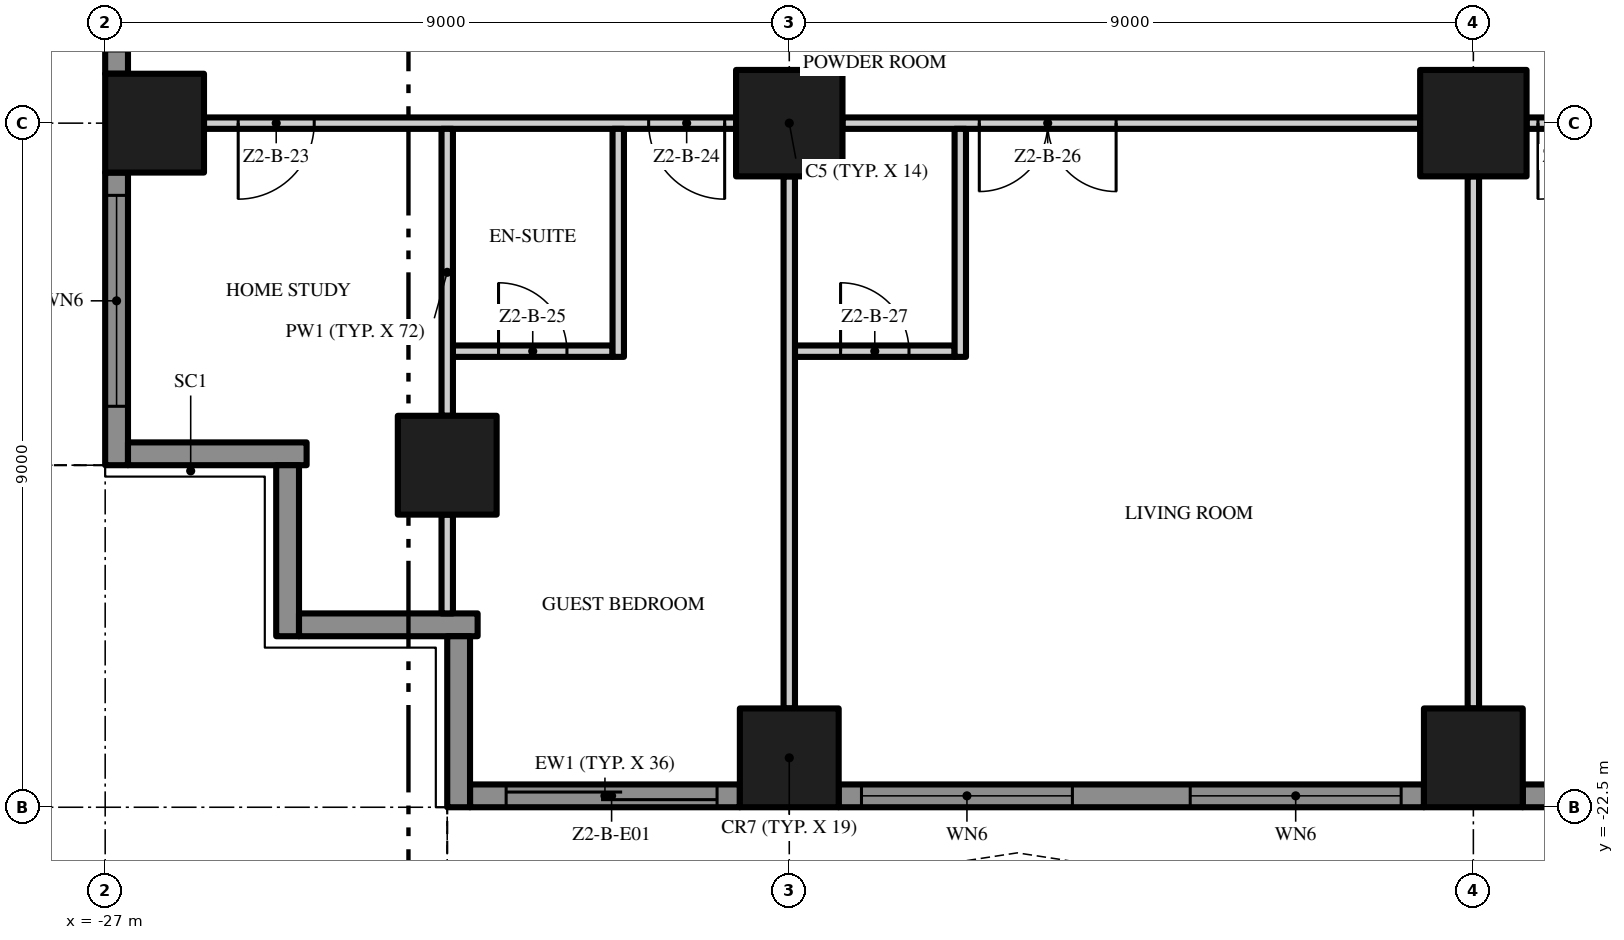
"""IFC4 building model, lengths in metres.
Left out: names, types, materials, properties, quantities, classifications, styles, units other than length and angle.
Written with IfcOpenShell. Run it as: python <this file> out.ifc"""

import sys

from ifc_helpers import new_model, si_unit, direction, frame, frame_2d, origin, origin_2d, place, context, subcontext, project, spatial, polyline, rectangle, outline, extrude, element, fill, save


model = new_model("IFC4")
c1 = context("Model", 3, precision=1e-05, world=origin(), true_north=direction((0.0, 1.0)))
c2 = subcontext(c1, "Body", "Model", "MODEL_VIEW")
j1 = project(units=[si_unit("LENGTHUNIT", "METRE"), si_unit("PLANEANGLEUNIT", "RADIAN")], contexts=[c1])
p1 = place(None, origin())
s1 = spatial("IfcSite", under=j1, at=p1, CompositionType="ELEMENT")
p2 = place(p1, origin())
s2 = spatial("IfcBuilding", under=s1, at=p2, CompositionType="ELEMENT")
p3 = place(p2, frame((0.0, 0.0, 84.6)))
s3 = spatial("IfcBuildingStorey", under=s2, at=p3, CompositionType="ELEMENT", Elevation=84.6)
p4 = place(p3, frame((-18.0, -13.5, 0.0), z_axis=(0.0, 0.0, 1.0), x_axis=(1.0, 0.0, 0.0)))
e1 = element("IfcColumn", 1, at=p4, inside=s3, PredefinedType="COLUMN", context=c2, shape_type="SweptSolid", body=[
    extrude(rectangle(XDim=1.4, YDim=1.4, at=origin_2d()), origin(), (0.0, 0.0, 1.0), 3.5),
])
for number, where, z_axis, x_axis in (
    (2, (-18.0, -21.85, 0.0), (0.0, 0.0, 1.0), (1.0, 0.0, 0.0)),
    (3, (-26.35, -13.5, 0.0), (0.0, 0.0, 1.0), (1.0, 0.0, 0.0)),
    (4, (-22.5, -18.0, 0.0), (0.0, 0.0, 1.0), (1.0, 0.0, 0.0)),
):
    element("IfcColumn", number, at=place(p3, frame(where, z_axis=z_axis, x_axis=x_axis)), inside=s3, PredefinedType="COLUMN", context=c2, shape_type="SweptSolid", body=[
        extrude(rectangle(XDim=1.3, YDim=1.3, at=origin_2d()), origin(), (0.0, 0.0, 1.0), 3.5),
    ])
p5 = place(p3, frame((-9.0, -13.5, 0.0), z_axis=(0.0, 0.0, 1.0), x_axis=(1.0, 0.0, 0.0)))
e5 = element("IfcColumn", 5, at=p5, inside=s3, PredefinedType="COLUMN", context=c2, shape_type="SweptSolid", body=[
    extrude(rectangle(XDim=1.4, YDim=1.4, at=origin_2d()), origin(), (0.0, 0.0, 1.0), 3.5),
])
p6 = place(p3, frame((-9.0, -21.85, 0.0), z_axis=(0.0, 0.0, 1.0), x_axis=(1.0, 0.0, 0.0)))
e6 = element("IfcColumn", 6, at=p6, inside=s3, PredefinedType="COLUMN", context=c2, shape_type="SweptSolid", body=[
    extrude(rectangle(XDim=1.3, YDim=1.3, at=origin_2d()), origin(), (0.0, 0.0, 1.0), 3.5),
])
p7 = place(p3, frame((-18.65, -22.35, 0.0), z_axis=(0.0, 0.0, 1.0), x_axis=(-1.0, 0.0, 0.0)))
e7 = element("IfcWall", 7, at=p7, inside=s3, PredefinedType="SOLIDWALL", context=c2, shape_type="SweptSolid", body=[
    extrude(rectangle(XDim=3.55, YDim=0.3, at=frame_2d((1.775, 0.0))), origin(), (0.0, 0.0, 1.0), 3.5),
])
p8 = place(p7, frame((0.3, 0.0, 0.0)))
e8 = element("IfcOpeningElement", 8, at=p8, cuts=e7, PredefinedType="OPENING", context=c2, shape_type="SweptSolid", body=[
    extrude(rectangle(XDim=2.775, YDim=2.4, at=frame_2d((1.387, 1.2))), frame((0.0, 0.16, 0.0), z_axis=(0.0, -1.0, 0.0), x_axis=(1.0, 0.0, 0.0)), (0.0, 0.0, 1.0), 0.32),
])
p9 = place(p3, frame((-9.65, -22.35, 0.0), z_axis=(0.0, 0.0, 1.0), x_axis=(-1.0, 0.0, 0.0)))
e9 = element("IfcWall", 9, at=p9, inside=s3, PredefinedType="SOLIDWALL", context=c2, shape_type="SweptSolid", body=[
    extrude(rectangle(XDim=7.7, YDim=0.3, at=frame_2d((3.85, 0.0))), origin(), (0.0, 0.0, 1.0), 3.5),
])
p10 = place(p9, frame((4.625, 0.0, 0.45)))
e10 = element("IfcOpeningElement", 10, at=p10, cuts=e9, PredefinedType="OPENING", context=c2, shape_type="SweptSolid", body=[
    extrude(rectangle(XDim=2.775, YDim=2.65, at=frame_2d((1.387, 1.325))), frame((0.0, 0.16, 0.0), z_axis=(0.0, -1.0, 0.0), x_axis=(1.0, 0.0, 0.0)), (0.0, 0.0, 1.0), 0.32),
])
p11 = place(p9, frame((0.3, 0.0, 0.45)))
e11 = element("IfcOpeningElement", 11, at=p11, cuts=e9, PredefinedType="OPENING", context=c2, shape_type="SweptSolid", body=[
    extrude(rectangle(XDim=2.775, YDim=2.65, at=frame_2d((1.387, 1.325))), frame((0.0, 0.16, 0.0), z_axis=(0.0, -1.0, 0.0), x_axis=(1.0, 0.0, 0.0)), (0.0, 0.0, 1.0), 0.32),
])
p12 = place(p3, frame((-0.65, -22.35, 0.0), z_axis=(0.0, 0.0, 1.0), x_axis=(-1.0, 0.0, 0.0)))
e12 = element("IfcWall", 12, at=p12, inside=s3, PredefinedType="SOLIDWALL", context=c2, shape_type="SweptSolid", body=[
    extrude(rectangle(XDim=7.7, YDim=0.3, at=frame_2d((3.85, 0.0))), origin(), (0.0, 0.0, 1.0), 3.5),
])
p13 = place(p12, frame((4.625, 0.0, 0.0)))
e13 = element("IfcOpeningElement", 13, at=p13, cuts=e12, PredefinedType="OPENING", context=c2, shape_type="SweptSolid", body=[
    extrude(rectangle(XDim=2.775, YDim=2.4, at=frame_2d((1.387, 1.2))), frame((0.0, 0.16, 0.0), z_axis=(0.0, -1.0, 0.0), x_axis=(1.0, 0.0, 0.0)), (0.0, 0.0, 1.0), 0.32),
])
p14 = place(p12, frame((0.3, 0.0, 0.45)))
e14 = element("IfcOpeningElement", 14, at=p14, cuts=e12, PredefinedType="OPENING", context=c2, shape_type="SweptSolid", body=[
    extrude(rectangle(XDim=2.775, YDim=2.65, at=frame_2d((1.387, 1.325))), frame((0.0, 0.16, 0.0), z_axis=(0.0, -1.0, 0.0), x_axis=(1.0, 0.0, 0.0)), (0.0, 0.0, 1.0), 0.32),
])
p15 = place(p3, frame((-26.85, -12.85, 0.0), z_axis=(0.0, 0.0, 1.0), x_axis=(0.0, 1.0, 0.0)))
e15 = element("IfcWall", 15, at=p15, inside=s3, PredefinedType="SOLIDWALL", context=c2, shape_type="SweptSolid", body=[
    extrude(rectangle(XDim=7.7, YDim=0.3, at=frame_2d((3.85, 0.0))), origin(), (0.0, 0.0, 1.0), 3.5),
])
p16 = place(p15, frame((4.625, 0.0, 0.45)))
e16 = element("IfcOpeningElement", 16, at=p16, cuts=e15, PredefinedType="OPENING", context=c2, shape_type="SweptSolid", body=[
    extrude(rectangle(XDim=2.775, YDim=2.65, at=frame_2d((1.387, 1.325))), frame((0.0, 0.16, 0.0), z_axis=(0.0, -1.0, 0.0), x_axis=(1.0, 0.0, 0.0)), (0.0, 0.0, 1.0), 0.32),
])
p17 = place(p15, frame((0.3, 0.0, 0.0)))
e17 = element("IfcOpeningElement", 17, at=p17, cuts=e15, PredefinedType="OPENING", context=c2, shape_type="SweptSolid", body=[
    extrude(rectangle(XDim=2.775, YDim=2.4, at=frame_2d((1.387, 1.2))), frame((0.0, 0.16, 0.0), z_axis=(0.0, -1.0, 0.0), x_axis=(1.0, 0.0, 0.0)), (0.0, 0.0, 1.0), 0.32),
])
p18 = place(p3, frame((-26.85, -18.0, 0.0), z_axis=(0.0, 0.0, 1.0), x_axis=(0.0, 1.0, 0.0)))
e18 = element("IfcWall", 18, at=p18, inside=s3, PredefinedType="SOLIDWALL", context=c2, shape_type="SweptSolid", body=[
    extrude(rectangle(XDim=3.85, YDim=0.3, at=frame_2d((1.925, 0.0))), origin(), (0.0, 0.0, 1.0), 3.5),
])
p19 = place(p18, frame((0.775, 0.0, 0.45)))
e19 = element("IfcOpeningElement", 19, at=p19, cuts=e18, PredefinedType="OPENING", context=c2, shape_type="SweptSolid", body=[
    extrude(rectangle(XDim=2.775, YDim=2.65, at=frame_2d((1.387, 1.325))), frame((0.0, 0.16, 0.0), z_axis=(0.0, -1.0, 0.0), x_axis=(1.0, 0.0, 0.0)), (0.0, 0.0, 1.0), 0.32),
])
p20 = place(p3, frame((-24.35, -17.85, 0.0), z_axis=(0.0, 0.0, 1.0), x_axis=(-1.0, 0.0, 0.0)))
e20 = element("IfcWall", 20, at=p20, inside=s3, PredefinedType="SOLIDWALL", context=c2, shape_type="SweptSolid", body=[
    extrude(rectangle(XDim=2.35, YDim=0.3, at=frame_2d((1.175, 0.0))), origin(), (0.0, 0.0, 1.0), 3.5),
])
p21 = place(p3, frame((-24.6, -20.25, 0.0), z_axis=(0.0, 0.0, 1.0), x_axis=(0.0, 1.0, 0.0)))
e21 = element("IfcWall", 21, at=p21, inside=s3, PredefinedType="SOLIDWALL", context=c2, shape_type="SweptSolid", body=[
    extrude(rectangle(XDim=2.25, YDim=0.3, at=frame_2d((1.125, 0.0))), origin(), (0.0, 0.0, 1.0), 3.5),
])
p22 = place(p3, frame((-22.1, -20.1, 0.0), z_axis=(0.0, 0.0, 1.0), x_axis=(-1.0, 0.0, 0.0)))
e22 = element("IfcWall", 22, at=p22, inside=s3, PredefinedType="SOLIDWALL", context=c2, shape_type="SweptSolid", body=[
    extrude(rectangle(XDim=2.35, YDim=0.3, at=frame_2d((1.175, 0.0))), origin(), (0.0, 0.0, 1.0), 3.5),
])
p23 = place(p3, frame((-22.35, -22.5, 0.0), z_axis=(0.0, 0.0, 1.0), x_axis=(0.0, 1.0, 0.0)))
e23 = element("IfcWall", 23, at=p23, inside=s3, PredefinedType="SOLIDWALL", context=c2, shape_type="SweptSolid", body=[
    extrude(rectangle(XDim=2.25, YDim=0.3, at=frame_2d((1.125, 0.0))), origin(), (0.0, 0.0, 1.0), 3.5),
])
p24 = place(p3, origin())
e24 = element("IfcWall", 24, at=p24, inside=s3, PredefinedType="USERDEFINED", context=c2, shape_type="SweptSolid", body=[
    extrude(outline(polyline([(-22.5, -25.5), (-21.0, -25.271), (-19.5, -24.671), (-18.0, -23.929), (-16.5, -23.329), (-15.0, -23.1), (-13.5, -23.329), (-12.0, -23.929), (-10.5, -24.671), (-9.0, -25.271), (-7.5, -25.5), (-6.0, -25.271), (-4.5, -24.671), (-3.0, -23.929), (-1.5, -23.329), (0.0, -23.1), (1.5, -23.329), (3.0, -23.929), (4.5, -24.671), (6.0, -25.271), (7.5, -25.5), (9.0, -25.271), (10.5, -24.671), (12.0, -23.929), (13.5, -23.329), (15.0, -23.1), (16.5, -23.329), (18.0, -23.929), (19.5, -24.671), (21.0, -25.271), (22.5, -25.5), (22.538, -25.253), (21.066, -25.028), (19.602, -24.442), (18.102, -23.701), (16.566, -23.086), (15.0, -22.847), (13.434, -23.086), (11.898, -23.701), (10.398, -24.442), (8.934, -25.028), (7.5, -25.247), (6.066, -25.028), (4.602, -24.442), (3.102, -23.701), (1.566, -23.086), (0.0, -22.847), (-1.566, -23.086), (-3.102, -23.701), (-4.602, -24.442), (-6.066, -25.028), (-7.5, -25.247), (-8.934, -25.028), (-10.398, -24.442), (-11.898, -23.701), (-13.434, -23.086), (-15.0, -22.847), (-16.566, -23.086), (-18.102, -23.701), (-19.602, -24.442), (-21.066, -25.028), (-22.538, -25.253), (-22.5, -25.5)])), origin(), (0.0, 0.0, 1.0), 0.9),
])
p25 = place(p3, origin())
e25 = element("IfcWall", 25, at=p25, inside=s3, PredefinedType="USERDEFINED", context=c2, shape_type="SweptSolid", body=[
    extrude(outline(polyline([(-30.0, 18.0), (-29.771, 16.5), (-29.171, 15.0), (-28.429, 13.5), (-27.829, 12.0), (-27.6, 10.5), (-27.829, 9.0), (-28.429, 7.5), (-29.171, 6.0), (-29.771, 4.5), (-30.0, 3.0), (-29.771, 1.5), (-29.171, 0.0), (-28.429, -1.5), (-27.829, -3.0), (-27.6, -4.5), (-27.829, -6.0), (-28.429, -7.5), (-29.171, -9.0), (-29.771, -10.5), (-30.0, -12.0), (-29.771, -13.5), (-29.171, -15.0), (-28.429, -16.5), (-27.829, -18.0), (-27.597, -17.907), (-28.201, -16.398), (-28.942, -14.898), (-29.528, -13.434), (-29.747, -12.0), (-29.528, -10.566), (-28.942, -9.102), (-28.201, -7.602), (-27.586, -6.066), (-27.347, -4.5), (-27.586, -2.934), (-28.201, -1.398), (-28.942, 0.102), (-29.528, 1.566), (-29.747, 3.0), (-29.528, 4.434), (-28.942, 5.898), (-28.201, 7.398), (-27.586, 8.934), (-27.347, 10.5), (-27.586, 12.066), (-28.201, 13.602), (-28.942, 15.102), (-29.528, 16.566), (-29.753, 18.038), (-30.0, 18.0)])), origin(), (0.0, 0.0, 1.0), 0.9),
])
p26 = place(p3, frame((-22.425, -16.5, 0.0), z_axis=(0.0, 0.0, 1.0), x_axis=(1.0, 0.0, 0.0)))
e26 = element("IfcWall", 26, at=p26, inside=s3, PredefinedType="PARTITIONING", context=c2, shape_type="SweptSolid", body=[
    extrude(rectangle(XDim=2.1, YDim=0.15, at=frame_2d((1.05, 0.0))), origin(), (0.0, 0.0, 1.0), 3.5),
])
p27 = place(p26, frame((0.6, 0.0, 0.0)))
e27 = element("IfcOpeningElement", 27, at=p27, cuts=e26, PredefinedType="OPENING", context=c2, shape_type="SweptSolid", body=[
    extrude(rectangle(XDim=0.9, YDim=2.1, at=frame_2d((0.45, 1.05))), frame((0.0, 0.085, 0.0), z_axis=(0.0, -1.0, 0.0), x_axis=(1.0, 0.0, 0.0)), (0.0, 0.0, 1.0), 0.17),
])
p28 = place(p3, frame((-17.925, -16.5, 0.0), z_axis=(0.0, 0.0, 1.0), x_axis=(1.0, 0.0, 0.0)))
e28 = element("IfcWall", 28, at=p28, inside=s3, PredefinedType="PARTITIONING", context=c2, shape_type="SweptSolid", body=[
    extrude(rectangle(XDim=2.1, YDim=0.15, at=frame_2d((1.05, 0.0))), origin(), (0.0, 0.0, 1.0), 3.5),
])
p29 = place(p28, frame((0.6, 0.0, 0.0)))
e29 = element("IfcOpeningElement", 29, at=p29, cuts=e28, PredefinedType="OPENING", context=c2, shape_type="SweptSolid", body=[
    extrude(rectangle(XDim=0.9, YDim=2.1, at=frame_2d((0.45, 1.05))), frame((0.0, 0.085, 0.0), z_axis=(0.0, -1.0, 0.0), x_axis=(1.0, 0.0, 0.0)), (0.0, 0.0, 1.0), 0.17),
])
p30 = place(p3, frame((-18.7, -13.5, 0.0), z_axis=(0.0, 0.0, 1.0), x_axis=(-1.0, 0.0, 0.0)))
e30 = element("IfcWall", 30, at=p30, inside=s3, PredefinedType="PARTITIONING", context=c2, shape_type="SweptSolid", body=[
    extrude(rectangle(XDim=7.0, YDim=0.15, at=frame_2d((3.5, 0.0))), origin(), (0.0, 0.0, 1.0), 3.5),
])
p31 = place(p30, frame((5.55, 0.0, 0.0)))
e31 = element("IfcOpeningElement", 31, at=p31, cuts=e30, PredefinedType="OPENING", context=c2, shape_type="SweptSolid", body=[
    extrude(rectangle(XDim=1.0, YDim=2.4, at=frame_2d((0.5, 1.2))), frame((0.0, 0.085, 0.0), z_axis=(0.0, -1.0, 0.0), x_axis=(1.0, 0.0, 0.0)), (0.0, 0.0, 1.0), 0.17),
])
p32 = place(p30, frame((0.15, 0.0, 0.0)))
e32 = element("IfcOpeningElement", 32, at=p32, cuts=e30, PredefinedType="OPENING", context=c2, shape_type="SweptSolid", body=[
    extrude(rectangle(XDim=1.0, YDim=2.4, at=frame_2d((0.5, 1.2))), frame((0.0, 0.085, 0.0), z_axis=(0.0, -1.0, 0.0), x_axis=(1.0, 0.0, 0.0)), (0.0, 0.0, 1.0), 0.17),
])
p33 = place(p3, frame((-9.7, -13.5, 0.0), z_axis=(0.0, 0.0, 1.0), x_axis=(-1.0, 0.0, 0.0)))
e33 = element("IfcWall", 33, at=p33, inside=s3, PredefinedType="PARTITIONING", context=c2, shape_type="SweptSolid", body=[
    extrude(rectangle(XDim=7.6, YDim=0.15, at=frame_2d((3.8, 0.0))), origin(), (0.0, 0.0, 1.0), 3.5),
])
p34 = place(p33, frame((4.0, 0.0, 0.0)))
e34 = element("IfcOpeningElement", 34, at=p34, cuts=e33, PredefinedType="OPENING", context=c2, shape_type="SweptSolid", body=[
    extrude(rectangle(XDim=1.8, YDim=2.4, at=frame_2d((0.9, 1.2))), frame((0.0, 0.085, 0.0), z_axis=(0.0, -1.0, 0.0), x_axis=(1.0, 0.0, 0.0)), (0.0, 0.0, 1.0), 0.17),
])
p35 = place(p3, frame((-0.7, -13.5, 0.0), z_axis=(0.0, 0.0, 1.0), x_axis=(-1.0, 0.0, 0.0)))
e35 = element("IfcWall", 35, at=p35, inside=s3, PredefinedType="PARTITIONING", context=c2, shape_type="SweptSolid", body=[
    extrude(rectangle(XDim=7.6, YDim=0.15, at=frame_2d((3.8, 0.0))), origin(), (0.0, 0.0, 1.0), 3.5),
])
p36 = place(p35, frame((6.45, 0.0, 0.0)))
e36 = element("IfcOpeningElement", 36, at=p36, cuts=e35, PredefinedType="OPENING", context=c2, shape_type="SweptSolid", body=[
    extrude(rectangle(XDim=1.0, YDim=2.4, at=frame_2d((0.5, 1.2))), frame((0.0, 0.085, 0.0), z_axis=(0.0, -1.0, 0.0), x_axis=(1.0, 0.0, 0.0)), (0.0, 0.0, 1.0), 0.17),
])
p37 = place(p35, frame((0.15, 0.0, 0.0)))
e37 = element("IfcOpeningElement", 37, at=p37, cuts=e35, PredefinedType="OPENING", context=c2, shape_type="SweptSolid", body=[
    extrude(rectangle(XDim=1.0, YDim=2.4, at=frame_2d((0.5, 1.2))), frame((0.0, 0.085, 0.0), z_axis=(0.0, -1.0, 0.0), x_axis=(1.0, 0.0, 0.0)), (0.0, 0.0, 1.0), 0.17),
])
p38 = place(p3, frame((-22.5, -19.95, 0.0), z_axis=(0.0, 0.0, 1.0), x_axis=(0.0, 1.0, 0.0)))
e38 = element("IfcWall", 38, at=p38, inside=s3, PredefinedType="PARTITIONING", context=c2, shape_type="SweptSolid", body=[
    extrude(rectangle(XDim=1.3, YDim=0.15, at=frame_2d((0.65, 0.0))), origin(), (0.0, 0.0, 1.0), 3.5),
])
p39 = place(p3, frame((-22.5, -17.35, 0.0), z_axis=(0.0, 0.0, 1.0), x_axis=(0.0, 1.0, 0.0)))
e39 = element("IfcWall", 39, at=p39, inside=s3, PredefinedType="PARTITIONING", context=c2, shape_type="SweptSolid", body=[
    extrude(rectangle(XDim=3.775, YDim=0.15, at=frame_2d((1.887, 0.0))), origin(), (0.0, 0.0, 1.0), 3.5),
])
p40 = place(p3, frame((-20.25, -16.575, 0.0), z_axis=(0.0, 0.0, 1.0), x_axis=(0.0, 1.0, 0.0)))
e40 = element("IfcWall", 40, at=p40, inside=s3, PredefinedType="PARTITIONING", context=c2, shape_type="SweptSolid", body=[
    extrude(rectangle(XDim=3.0, YDim=0.15, at=frame_2d((1.5, 0.0))), origin(), (0.0, 0.0, 1.0), 3.5),
])
p41 = place(p3, frame((-18.0, -21.2, 0.0), z_axis=(0.0, 0.0, 1.0), x_axis=(0.0, 1.0, 0.0)))
e41 = element("IfcWall", 41, at=p41, inside=s3, PredefinedType="PARTITIONING", context=c2, shape_type="SweptSolid", body=[
    extrude(rectangle(XDim=7.0, YDim=0.15, at=frame_2d((3.5, 0.0))), origin(), (0.0, 0.0, 1.0), 3.5),
])
p42 = place(p3, frame((-15.75, -16.575, 0.0), z_axis=(0.0, 0.0, 1.0), x_axis=(0.0, 1.0, 0.0)))
e42 = element("IfcWall", 42, at=p42, inside=s3, PredefinedType="PARTITIONING", context=c2, shape_type="SweptSolid", body=[
    extrude(rectangle(XDim=3.0, YDim=0.15, at=frame_2d((1.5, 0.0))), origin(), (0.0, 0.0, 1.0), 3.5),
])
p43 = place(p3, frame((-9.0, -21.2, 0.0), z_axis=(0.0, 0.0, 1.0), x_axis=(0.0, 1.0, 0.0)))
e43 = element("IfcWall", 43, at=p43, inside=s3, PredefinedType="PARTITIONING", context=c2, shape_type="SweptSolid", body=[
    extrude(rectangle(XDim=7.0, YDim=0.15, at=frame_2d((3.5, 0.0))), origin(), (0.0, 0.0, 1.0), 3.5),
])
p44 = place(p8, origin())
e44 = element("IfcDoor", 44, at=p44, inside=s3, OperationType="SINGLE_SWING_LEFT", PredefinedType="DOOR", context=c2, shape_type="SweptSolid", body=[
    extrude(rectangle(XDim=2.775, YDim=2.4, at=frame_2d((1.387, 1.2))), frame((0.0, 0.025, 0.0), z_axis=(0.0, -1.0, 0.0), x_axis=(1.0, 0.0, 0.0)), (0.0, 0.0, 1.0), 0.05),
])
fill(e8, e44)
p45 = place(p10, origin())
e45 = element("IfcWindow", 45, at=p45, inside=s3, PartitioningType="SINGLE_PANEL", PredefinedType="WINDOW", context=c2, shape_type="SweptSolid", body=[
    extrude(rectangle(XDim=2.775, YDim=2.65, at=frame_2d((1.387, 1.325))), frame((0.0, 0.03, 0.0), z_axis=(0.0, -1.0, 0.0), x_axis=(1.0, 0.0, 0.0)), (0.0, 0.0, 1.0), 0.06),
])
fill(e10, e45)
p46 = place(p11, origin())
e46 = element("IfcWindow", 46, at=p46, inside=s3, PartitioningType="SINGLE_PANEL", PredefinedType="WINDOW", context=c2, shape_type="SweptSolid", body=[
    extrude(rectangle(XDim=2.775, YDim=2.65, at=frame_2d((1.387, 1.325))), frame((0.0, 0.03, 0.0), z_axis=(0.0, -1.0, 0.0), x_axis=(1.0, 0.0, 0.0)), (0.0, 0.0, 1.0), 0.06),
])
fill(e11, e46)
p47 = place(p19, origin())
e47 = element("IfcWindow", 47, at=p47, inside=s3, PartitioningType="SINGLE_PANEL", PredefinedType="WINDOW", context=c2, shape_type="SweptSolid", body=[
    extrude(rectangle(XDim=2.775, YDim=2.65, at=frame_2d((1.387, 1.325))), frame((0.0, 0.03, 0.0), z_axis=(0.0, -1.0, 0.0), x_axis=(1.0, 0.0, 0.0)), (0.0, 0.0, 1.0), 0.06),
])
fill(e19, e47)
p48 = place(p31, origin())
e48 = element("IfcDoor", 48, at=p48, inside=s3, OperationType="SINGLE_SWING_RIGHT", PredefinedType="DOOR", context=c2, shape_type="SweptSolid", body=[
    extrude(rectangle(XDim=1.0, YDim=2.4, at=frame_2d((0.5, 1.2))), frame((0.0, 0.025, 0.0), z_axis=(0.0, -1.0, 0.0), x_axis=(1.0, 0.0, 0.0)), (0.0, 0.0, 1.0), 0.05),
])
fill(e31, e48)
p49 = place(p32, origin())
e49 = element("IfcDoor", 49, at=p49, inside=s3, OperationType="SINGLE_SWING_LEFT", PredefinedType="DOOR", context=c2, shape_type="SweptSolid", body=[
    extrude(rectangle(XDim=1.0, YDim=2.4, at=frame_2d((0.5, 1.2))), frame((0.0, 0.025, 0.0), z_axis=(0.0, -1.0, 0.0), x_axis=(1.0, 0.0, 0.0)), (0.0, 0.0, 1.0), 0.05),
])
fill(e32, e49)
p50 = place(p27, origin())
e50 = element("IfcDoor", 50, at=p50, inside=s3, OperationType="SINGLE_SWING_LEFT", PredefinedType="DOOR", context=c2, shape_type="SweptSolid", body=[
    extrude(rectangle(XDim=0.9, YDim=2.1, at=frame_2d((0.45, 1.05))), frame((0.0, 0.025, 0.0), z_axis=(0.0, -1.0, 0.0), x_axis=(1.0, 0.0, 0.0)), (0.0, 0.0, 1.0), 0.05),
])
fill(e27, e50)
p51 = place(p34, origin())
e51 = element("IfcDoor", 51, at=p51, inside=s3, OperationType="DOUBLE_DOOR_SINGLE_SWING", PredefinedType="DOOR", context=c2, shape_type="SweptSolid", body=[
    extrude(rectangle(XDim=1.8, YDim=2.4, at=frame_2d((0.9, 1.2))), frame((0.0, 0.025, 0.0), z_axis=(0.0, -1.0, 0.0), x_axis=(1.0, 0.0, 0.0)), (0.0, 0.0, 1.0), 0.05),
])
fill(e34, e51)
p52 = place(p29, origin())
e52 = element("IfcDoor", 52, at=p52, inside=s3, OperationType="SINGLE_SWING_LEFT", PredefinedType="DOOR", context=c2, shape_type="SweptSolid", body=[
    extrude(rectangle(XDim=0.9, YDim=2.1, at=frame_2d((0.45, 1.05))), frame((0.0, 0.025, 0.0), z_axis=(0.0, -1.0, 0.0), x_axis=(1.0, 0.0, 0.0)), (0.0, 0.0, 1.0), 0.05),
])
fill(e29, e52)
p53 = place(p36, origin())
e53 = element("IfcDoor", 53, at=p53, inside=s3, OperationType="SINGLE_SWING_RIGHT", PredefinedType="DOOR", context=c2, shape_type="SweptSolid", body=[
    extrude(rectangle(XDim=1.0, YDim=2.4, at=frame_2d((0.5, 1.2))), frame((0.0, 0.025, 0.0), z_axis=(0.0, -1.0, 0.0), x_axis=(1.0, 0.0, 0.0)), (0.0, 0.0, 1.0), 0.05),
])
fill(e36, e53)
save(model, sys.argv[1])
